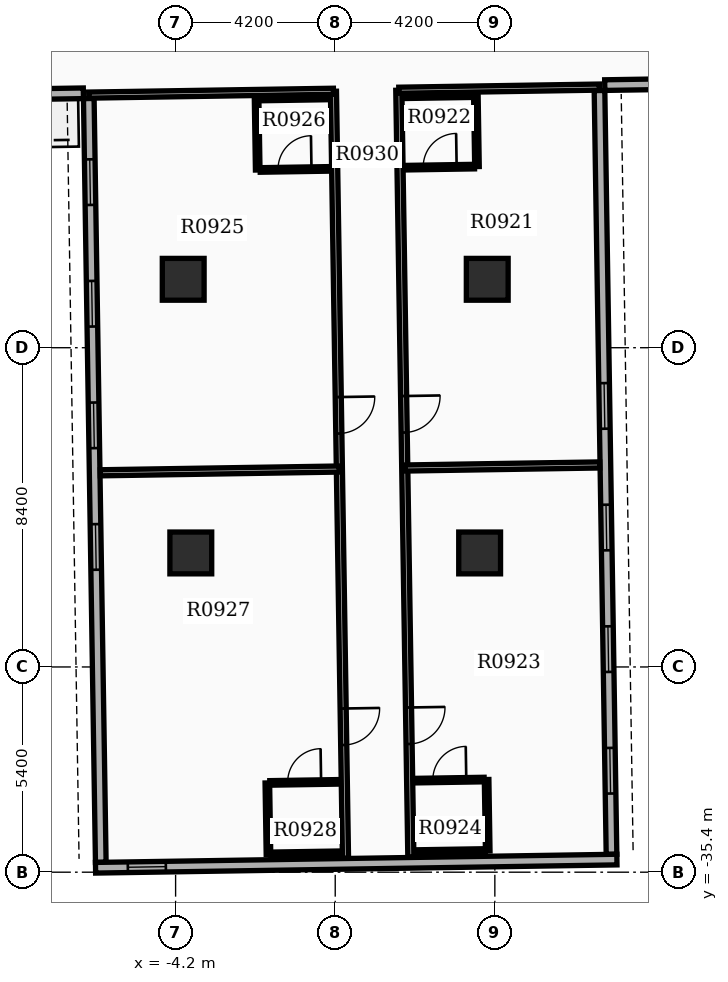
"""IFC4 building model, lengths in metres.
Left out: names, types, materials, properties, quantities, classifications, styles, units other than length and angle.
Written with IfcOpenShell. Run it as: python <this file> out.ifc"""

import sys

from ifc_helpers import new_model, si_unit, direction, frame, frame_2d, origin, origin_2d, place, context, subcontext, project, spatial, rectangle, extrude, element, fill, save


model = new_model("IFC4")
c1 = context("Model", 3, precision=1e-05, world=origin(), true_north=direction((0.0, 1.0)))
c2 = subcontext(c1, "Body", "Model", "MODEL_VIEW")
j1 = project(units=[si_unit("LENGTHUNIT", "METRE"), si_unit("PLANEANGLEUNIT", "RADIAN")], contexts=[c1])
p1 = place(None, origin())
s1 = spatial("IfcSite", under=j1, at=p1, CompositionType="ELEMENT")
p2 = place(p1, origin())
s2 = spatial("IfcBuilding", under=s1, at=p2, CompositionType="ELEMENT")
p3 = place(p2, frame((0.0, 0.0, 60.0)))
s3 = spatial("IfcBuildingStorey", under=s2, at=p3, CompositionType="ELEMENT", Elevation=60.0)
for number, where, z_axis, x_axis in (
    (1, (-4.0, -19.8, 0.0), (0.0, 0.0, 1.0), (1.0, 0.0, 0.0)),
    (2, (4.0, -19.8, 0.0), (0.0, 0.0, 1.0), (1.0, 0.0, 0.0)),
    (3, (-3.8, -27.0, 0.0), (0.0, 0.0, 1.0), (1.0, 0.0, 0.0)),
    (4, (3.8, -27.0, 0.0), (0.0, 0.0, 1.0), (1.0, 0.0, 0.0)),
):
    element("IfcColumn", number, at=place(p3, frame(where, z_axis=z_axis, x_axis=x_axis)), inside=s3, PredefinedType="COLUMN", context=c2, shape_type="SweptSolid", body=[
        extrude(rectangle(XDim=1.1, YDim=1.1, at=origin_2d()), origin(), (0.0, 0.0, 1.0), 3.9),
    ])
p4 = place(p3, frame((-6.485, -15.044, 0.0), z_axis=(0.0, 0.0, 1.0), x_axis=(0.01571739401, -0.999876474133, 0.0)))
e5 = element("IfcWall", 5, at=p4, inside=s3, PredefinedType="STANDARD", context=c2, shape_type="SweptSolid", body=[
    extrude(rectangle(XDim=20.1, YDim=0.28, at=frame_2d((10.05, 0.0))), origin(), (0.0, 0.0, 1.0), 2.91),
])
p5 = place(p4, frame((1.6, 0.0, 0.8)))
e6 = element("IfcOpeningElement", 6, at=p5, cuts=e5, PredefinedType="OPENING", context=c2, shape_type="SweptSolid", body=[
    extrude(rectangle(XDim=1.2, YDim=1.6, at=frame_2d((0.6, 0.8))), frame((0.0, 0.15, 0.0), z_axis=(0.0, -1.0, 0.0), x_axis=(1.0, 0.0, 0.0)), (0.0, 0.0, 1.0), 0.3),
])
p6 = place(p4, frame((4.8, 0.0, 0.8)))
e7 = element("IfcOpeningElement", 7, at=p6, cuts=e5, PredefinedType="OPENING", context=c2, shape_type="SweptSolid", body=[
    extrude(rectangle(XDim=1.2, YDim=1.6, at=frame_2d((0.6, 0.8))), frame((0.0, 0.15, 0.0), z_axis=(0.0, -1.0, 0.0), x_axis=(1.0, 0.0, 0.0)), (0.0, 0.0, 1.0), 0.3),
])
p7 = place(p4, frame((8.0, 0.0, 0.8)))
e8 = element("IfcOpeningElement", 8, at=p7, cuts=e5, PredefinedType="OPENING", context=c2, shape_type="SweptSolid", body=[
    extrude(rectangle(XDim=1.2, YDim=1.6, at=frame_2d((0.6, 0.8))), frame((0.0, 0.15, 0.0), z_axis=(0.0, -1.0, 0.0), x_axis=(1.0, 0.0, 0.0)), (0.0, 0.0, 1.0), 0.3),
])
p8 = place(p4, frame((11.2, 0.0, 0.8)))
e9 = element("IfcOpeningElement", 9, at=p8, cuts=e5, PredefinedType="OPENING", context=c2, shape_type="SweptSolid", body=[
    extrude(rectangle(XDim=1.2, YDim=1.6, at=frame_2d((0.6, 0.8))), frame((0.0, 0.15, 0.0), z_axis=(0.0, -1.0, 0.0), x_axis=(1.0, 0.0, 0.0)), (0.0, 0.0, 1.0), 0.3),
])
p9 = place(p3, frame((7.27, -34.93, 0.0), z_axis=(0.0, 0.0, 1.0), x_axis=(-0.015705059908, 0.999876667941, 0.0)))
e10 = element("IfcWall", 10, at=p9, inside=s3, PredefinedType="STANDARD", context=c2, shape_type="SweptSolid", body=[
    extrude(rectangle(XDim=20.1, YDim=0.28, at=frame_2d((10.05, 0.0))), origin(), (0.0, 0.0, 1.0), 2.91),
])
p10 = place(p9, frame((1.6, 0.0, 0.8)))
e11 = element("IfcOpeningElement", 11, at=p10, cuts=e10, PredefinedType="OPENING", context=c2, shape_type="SweptSolid", body=[
    extrude(rectangle(XDim=1.2, YDim=1.6, at=frame_2d((0.6, 0.8))), frame((0.0, 0.15, 0.0), z_axis=(0.0, -1.0, 0.0), x_axis=(1.0, 0.0, 0.0)), (0.0, 0.0, 1.0), 0.3),
])
p11 = place(p9, frame((4.8, 0.0, 0.8)))
e12 = element("IfcOpeningElement", 12, at=p11, cuts=e10, PredefinedType="OPENING", context=c2, shape_type="SweptSolid", body=[
    extrude(rectangle(XDim=1.2, YDim=1.6, at=frame_2d((0.6, 0.8))), frame((0.0, 0.15, 0.0), z_axis=(0.0, -1.0, 0.0), x_axis=(1.0, 0.0, 0.0)), (0.0, 0.0, 1.0), 0.3),
])
p12 = place(p9, frame((8.0, 0.0, 0.8)))
e13 = element("IfcOpeningElement", 13, at=p12, cuts=e10, PredefinedType="OPENING", context=c2, shape_type="SweptSolid", body=[
    extrude(rectangle(XDim=1.2, YDim=1.6, at=frame_2d((0.6, 0.8))), frame((0.0, 0.15, 0.0), z_axis=(0.0, -1.0, 0.0), x_axis=(1.0, 0.0, 0.0)), (0.0, 0.0, 1.0), 0.3),
])
p13 = place(p9, frame((11.2, 0.0, 0.8)))
e14 = element("IfcOpeningElement", 14, at=p13, cuts=e10, PredefinedType="OPENING", context=c2, shape_type="SweptSolid", body=[
    extrude(rectangle(XDim=1.2, YDim=1.6, at=frame_2d((0.6, 0.8))), frame((0.0, 0.15, 0.0), z_axis=(0.0, -1.0, 0.0), x_axis=(1.0, 0.0, 0.0)), (0.0, 0.0, 1.0), 0.3),
])
p14 = place(p3, frame((-6.307, -35.283, 0.0), z_axis=(0.0, 0.0, 1.0), x_axis=(0.999876549481, 0.015712599986, 0.0)))
e15 = element("IfcWall", 15, at=p14, inside=s3, PredefinedType="STANDARD", context=c2, shape_type="SweptSolid", body=[
    extrude(rectangle(XDim=13.72, YDim=0.28, at=frame_2d((6.86, 0.0))), origin(), (0.0, 0.0, 1.0), 2.91),
])
p15 = place(p14, frame((0.85, 0.0, 0.85)))
e16 = element("IfcOpeningElement", 16, at=p15, cuts=e15, PredefinedType="OPENING", context=c2, shape_type="SweptSolid", body=[
    extrude(rectangle(XDim=1.0, YDim=1.5, at=frame_2d((0.5, 0.75))), frame((0.0, 0.15, 0.0), z_axis=(0.0, -1.0, 0.0), x_axis=(1.0, 0.0, 0.0)), (0.0, 0.0, 1.0), 0.3),
])
p16 = place(p3, frame((-12.926, -15.005, 0.0), z_axis=(0.0, 0.0, 1.0), x_axis=(0.999876823822, 0.015695132501, 0.0)))
e17 = element("IfcWall", 17, at=p16, inside=s3, PredefinedType="STANDARD", context=c2, shape_type="SweptSolid", body=[
    extrude(rectangle(XDim=6.3, YDim=0.28, at=frame_2d((3.15, 0.0))), origin(), (0.0, 0.0, 1.0), 2.91),
])
p17 = place(p3, frame((13.391, -14.592, 0.0), z_axis=(0.0, 0.0, 1.0), x_axis=(-0.999876833368, -0.015694524359, 0.0)))
e18 = element("IfcWall", 18, at=p17, inside=s3, PredefinedType="STANDARD", context=c2, shape_type="SweptSolid", body=[
    extrude(rectangle(XDim=6.3, YDim=0.28, at=frame_2d((3.15, 0.0))), origin(), (0.0, 0.0, 1.0), 2.91),
])
p18 = place(p3, frame((1.673, -14.825, 0.0), z_axis=(0.0, 0.0, 1.0), x_axis=(0.015701893165, -0.999876717676, 0.0)))
e19 = element("IfcWall", 19, at=p18, inside=s3, PredefinedType="PARTITIONING", context=c2, shape_type="SweptSolid", body=[
    extrude(rectangle(XDim=20.182, YDim=0.16, at=frame_2d((10.091, 0.0))), origin(), (0.0, 0.0, 1.0), 2.9),
])
p19 = place(p18, frame((8.047, 0.0, 0.0)))
e20 = element("IfcOpeningElement", 20, at=p19, cuts=e19, PredefinedType="OPENING", context=c2, shape_type="SweptSolid", body=[
    extrude(rectangle(XDim=0.96, YDim=2.15, at=frame_2d((0.48, 1.075))), frame((0.0, 0.09, 0.0), z_axis=(0.0, -1.0, 0.0), x_axis=(1.0, 0.0, 0.0)), (0.0, 0.0, 1.0), 0.18),
])
p20 = place(p18, frame((16.243, 0.0, 0.0)))
e21 = element("IfcOpeningElement", 21, at=p20, cuts=e19, PredefinedType="OPENING", context=c2, shape_type="SweptSolid", body=[
    extrude(rectangle(XDim=0.96, YDim=2.15, at=frame_2d((0.48, 1.075))), frame((0.0, 0.09, 0.0), z_axis=(0.0, -1.0, 0.0), x_axis=(1.0, 0.0, 0.0)), (0.0, 0.0, 1.0), 0.18),
])
p21 = place(p3, frame((1.673, -14.825, 0.0), z_axis=(0.0, 0.0, 1.0), x_axis=(0.999877138082, 0.015675099418, 0.0)))
e22 = element("IfcWall", 22, at=p21, inside=s3, PredefinedType="PARTITIONING", context=c2, shape_type="SweptSolid", body=[
    extrude(rectangle(XDim=5.28, YDim=0.16, at=frame_2d((2.64, 0.0))), origin(), (0.0, 0.0, 1.0), 2.9),
])
p22 = place(p3, frame((1.829, -24.765, 0.0), z_axis=(0.0, 0.0, 1.0), x_axis=(0.99987677651, 0.01569814626, 0.0)))
e23 = element("IfcWall", 23, at=p22, inside=s3, PredefinedType="PARTITIONING", context=c2, shape_type="SweptSolid", body=[
    extrude(rectangle(XDim=5.132, YDim=0.16, at=frame_2d((2.566, 0.0))), origin(), (0.0, 0.0, 1.0), 2.9),
])
p23 = place(p3, frame((1.845, -16.863, 0.0), z_axis=(0.0, 0.0, 1.0), x_axis=(0.999876803258, 0.015696442504, 0.0)))
e24 = element("IfcWall", 24, at=p23, inside=s3, PredefinedType="PARTITIONING", context=c2, shape_type="SweptSolid", body=[
    extrude(rectangle(XDim=1.82, YDim=0.12, at=frame_2d((0.91, 0.0))), origin(), (0.0, 0.0, 1.0), 2.9),
])
p24 = place(p23, frame((0.47, 0.0, 0.0)))
e25 = element("IfcOpeningElement", 25, at=p24, cuts=e24, PredefinedType="OPENING", context=c2, shape_type="SweptSolid", body=[
    extrude(rectangle(XDim=0.88, YDim=2.1, at=frame_2d((0.44, 1.05))), frame((0.0, 0.07, 0.0), z_axis=(0.0, -1.0, 0.0), x_axis=(1.0, 0.0, 0.0)), (0.0, 0.0, 1.0), 0.14),
])
p25 = place(p3, frame((1.816, -14.983, 0.0), z_axis=(0.0, 0.0, 1.0), x_axis=(0.999874688728, 0.015830566654, 0.0)))
e26 = element("IfcWall", 26, at=p25, inside=s3, PredefinedType="PARTITIONING", context=c2, shape_type="SweptSolid", body=[
    extrude(rectangle(XDim=1.82, YDim=0.12, at=frame_2d((0.91, 0.0))), origin(), (0.0, 0.0, 1.0), 2.9),
])
p26 = place(p3, frame((3.7, -14.954, 0.0), z_axis=(0.0, 0.0, 1.0), x_axis=(0.015842167482, -0.99987450499, 0.0)))
e27 = element("IfcWall", 27, at=p26, inside=s3, PredefinedType="PARTITIONING", context=c2, shape_type="SweptSolid", body=[
    extrude(rectangle(XDim=1.88, YDim=0.12, at=frame_2d((0.94, 0.0))), origin(), (0.0, 0.0, 1.0), 2.9),
])
p27 = place(p3, frame((2.098, -32.991, 0.0), z_axis=(0.0, 0.0, 1.0), x_axis=(0.999874722342, 0.015828443418, 0.0)))
e28 = element("IfcWall", 28, at=p27, inside=s3, PredefinedType="PARTITIONING", context=c2, shape_type="SweptSolid", body=[
    extrude(rectangle(XDim=1.82, YDim=0.12, at=frame_2d((0.91, 0.0))), origin(), (0.0, 0.0, 1.0), 2.9),
])
p28 = place(p27, frame((0.47, 0.0, 0.0)))
e29 = element("IfcOpeningElement", 29, at=p28, cuts=e28, PredefinedType="OPENING", context=c2, shape_type="SweptSolid", body=[
    extrude(rectangle(XDim=0.88, YDim=2.1, at=frame_2d((0.44, 1.05))), frame((0.0, 0.07, 0.0), z_axis=(0.0, -1.0, 0.0), x_axis=(1.0, 0.0, 0.0)), (0.0, 0.0, 1.0), 0.14),
])
p29 = place(p3, frame((2.128, -34.871, 0.0), z_axis=(0.0, 0.0, 1.0), x_axis=(0.999876836305, 0.015694337248, 0.0)))
e30 = element("IfcWall", 30, at=p29, inside=s3, PredefinedType="PARTITIONING", context=c2, shape_type="SweptSolid", body=[
    extrude(rectangle(XDim=1.82, YDim=0.12, at=frame_2d((0.91, 0.0))), origin(), (0.0, 0.0, 1.0), 2.9),
])
p30 = place(p3, frame((3.983, -32.961, 0.0), z_axis=(0.0, 0.0, 1.0), x_axis=(0.01571234584, -0.999876553475, 0.0)))
e31 = element("IfcWall", 31, at=p30, inside=s3, PredefinedType="PARTITIONING", context=c2, shape_type="SweptSolid", body=[
    extrude(rectangle(XDim=1.88, YDim=0.12, at=frame_2d((0.94, 0.0))), origin(), (0.0, 0.0, 1.0), 2.9),
])
p31 = place(p3, frame((-0.047, -14.853, 0.0), z_axis=(0.0, 0.0, 1.0), x_axis=(0.015701893165, -0.999876717676, 0.0)))
e32 = element("IfcWall", 32, at=p31, inside=s3, PredefinedType="PARTITIONING", context=c2, shape_type="SweptSolid", body=[
    extrude(rectangle(XDim=20.182, YDim=0.16, at=frame_2d((10.091, 0.0))), origin(), (0.0, 0.0, 1.0), 2.9),
])
p32 = place(p31, frame((8.047, 0.0, 0.0)))
e33 = element("IfcOpeningElement", 33, at=p32, cuts=e32, PredefinedType="OPENING", context=c2, shape_type="SweptSolid", body=[
    extrude(rectangle(XDim=0.96, YDim=2.15, at=frame_2d((0.48, 1.075))), frame((0.0, 0.09, 0.0), z_axis=(0.0, -1.0, 0.0), x_axis=(1.0, 0.0, 0.0)), (0.0, 0.0, 1.0), 0.18),
])
p33 = place(p31, frame((16.243, 0.0, 0.0)))
e34 = element("IfcOpeningElement", 34, at=p33, cuts=e32, PredefinedType="OPENING", context=c2, shape_type="SweptSolid", body=[
    extrude(rectangle(XDim=0.96, YDim=2.15, at=frame_2d((0.48, 1.075))), frame((0.0, 0.09, 0.0), z_axis=(0.0, -1.0, 0.0), x_axis=(1.0, 0.0, 0.0)), (0.0, 0.0, 1.0), 0.18),
])
p34 = place(p3, frame((-0.047, -14.853, 0.0), z_axis=(0.0, 0.0, 1.0), x_axis=(-0.99987682984, -0.015694749102, 0.0)))
e35 = element("IfcWall", 35, at=p34, inside=s3, PredefinedType="PARTITIONING", context=c2, shape_type="SweptSolid", body=[
    extrude(rectangle(XDim=6.44, YDim=0.16, at=frame_2d((3.22, 0.0))), origin(), (0.0, 0.0, 1.0), 2.9),
])
p35 = place(p3, frame((0.109, -24.792, 0.0), z_axis=(0.0, 0.0, 1.0), x_axis=(-0.999876517768, -0.01571461794, 0.0)))
e36 = element("IfcWall", 36, at=p35, inside=s3, PredefinedType="PARTITIONING", context=c2, shape_type="SweptSolid", body=[
    extrude(rectangle(XDim=6.292, YDim=0.16, at=frame_2d((3.146, 0.0))), origin(), (0.0, 0.0, 1.0), 2.9),
])
p36 = place(p3, frame((-1.974, -16.923, 0.0), z_axis=(0.0, 0.0, 1.0), x_axis=(0.999876803258, 0.015696442504, 0.0)))
e37 = element("IfcWall", 37, at=p36, inside=s3, PredefinedType="PARTITIONING", context=c2, shape_type="SweptSolid", body=[
    extrude(rectangle(XDim=1.82, YDim=0.12, at=frame_2d((0.91, 0.0))), origin(), (0.0, 0.0, 1.0), 2.9),
])
p37 = place(p36, frame((0.47, 0.0, 0.0)))
e38 = element("IfcOpeningElement", 38, at=p37, cuts=e37, PredefinedType="OPENING", context=c2, shape_type="SweptSolid", body=[
    extrude(rectangle(XDim=0.88, YDim=2.1, at=frame_2d((0.44, 1.05))), frame((0.0, 0.07, 0.0), z_axis=(0.0, -1.0, 0.0), x_axis=(1.0, 0.0, 0.0)), (0.0, 0.0, 1.0), 0.14),
])
p38 = place(p3, frame((-2.004, -15.043, 0.0), z_axis=(0.0, 0.0, 1.0), x_axis=(0.999876836305, 0.015694337248, 0.0)))
e39 = element("IfcWall", 39, at=p38, inside=s3, PredefinedType="PARTITIONING", context=c2, shape_type="SweptSolid", body=[
    extrude(rectangle(XDim=1.82, YDim=0.12, at=frame_2d((0.91, 0.0))), origin(), (0.0, 0.0, 1.0), 2.9),
])
p39 = place(p3, frame((-2.069, -15.044, 0.0), z_axis=(0.0, 0.0, 1.0), x_axis=(0.015714386166, -0.99987652141, 0.0)))
e40 = element("IfcWall", 40, at=p39, inside=s3, PredefinedType="PARTITIONING", context=c2, shape_type="SweptSolid", body=[
    extrude(rectangle(XDim=1.88, YDim=0.12, at=frame_2d((0.94, 0.0))), origin(), (0.0, 0.0, 1.0), 2.9),
])
p40 = place(p3, frame((-1.721, -33.051, 0.0), z_axis=(0.0, 0.0, 1.0), x_axis=(0.999876836305, 0.015694337248, 0.0)))
e41 = element("IfcWall", 41, at=p40, inside=s3, PredefinedType="PARTITIONING", context=c2, shape_type="SweptSolid", body=[
    extrude(rectangle(XDim=1.82, YDim=0.12, at=frame_2d((0.91, 0.0))), origin(), (0.0, 0.0, 1.0), 2.9),
])
p41 = place(p40, frame((0.47, 0.0, 0.0)))
e42 = element("IfcOpeningElement", 42, at=p41, cuts=e41, PredefinedType="OPENING", context=c2, shape_type="SweptSolid", body=[
    extrude(rectangle(XDim=0.88, YDim=2.1, at=frame_2d((0.44, 1.05))), frame((0.0, 0.07, 0.0), z_axis=(0.0, -1.0, 0.0), x_axis=(1.0, 0.0, 0.0)), (0.0, 0.0, 1.0), 0.14),
])
p42 = place(p3, frame((-1.691, -34.931, 0.0), z_axis=(0.0, 0.0, 1.0), x_axis=(0.999876803258, 0.015696442504, 0.0)))
e43 = element("IfcWall", 43, at=p42, inside=s3, PredefinedType="PARTITIONING", context=c2, shape_type="SweptSolid", body=[
    extrude(rectangle(XDim=1.82, YDim=0.12, at=frame_2d((0.91, 0.0))), origin(), (0.0, 0.0, 1.0), 2.9),
])
p43 = place(p3, frame((-1.786, -33.052, 0.0), z_axis=(0.0, 0.0, 1.0), x_axis=(0.01571234584, -0.999876553475, 0.0)))
e44 = element("IfcWall", 44, at=p43, inside=s3, PredefinedType="PARTITIONING", context=c2, shape_type="SweptSolid", body=[
    extrude(rectangle(XDim=1.88, YDim=0.12, at=frame_2d((0.94, 0.0))), origin(), (0.0, 0.0, 1.0), 2.9),
])
p44 = place(p5, origin())
e45 = element("IfcWindow", 45, at=p44, inside=s3, PartitioningType="SINGLE_PANEL", PredefinedType="WINDOW", context=c2, shape_type="SweptSolid", body=[
    extrude(rectangle(XDim=1.2, YDim=1.6, at=frame_2d((0.6, 0.8))), frame((0.0, 0.03, 0.0), z_axis=(0.0, -1.0, 0.0), x_axis=(1.0, 0.0, 0.0)), (0.0, 0.0, 1.0), 0.06),
])
fill(e6, e45)
p45 = place(p6, origin())
e46 = element("IfcWindow", 46, at=p45, inside=s3, PartitioningType="SINGLE_PANEL", PredefinedType="WINDOW", context=c2, shape_type="SweptSolid", body=[
    extrude(rectangle(XDim=1.2, YDim=1.6, at=frame_2d((0.6, 0.8))), frame((0.0, 0.03, 0.0), z_axis=(0.0, -1.0, 0.0), x_axis=(1.0, 0.0, 0.0)), (0.0, 0.0, 1.0), 0.06),
])
fill(e7, e46)
p46 = place(p7, origin())
e47 = element("IfcWindow", 47, at=p46, inside=s3, PartitioningType="SINGLE_PANEL", PredefinedType="WINDOW", context=c2, shape_type="SweptSolid", body=[
    extrude(rectangle(XDim=1.2, YDim=1.6, at=frame_2d((0.6, 0.8))), frame((0.0, 0.03, 0.0), z_axis=(0.0, -1.0, 0.0), x_axis=(1.0, 0.0, 0.0)), (0.0, 0.0, 1.0), 0.06),
])
fill(e8, e47)
p47 = place(p8, origin())
e48 = element("IfcWindow", 48, at=p47, inside=s3, PartitioningType="SINGLE_PANEL", PredefinedType="WINDOW", context=c2, shape_type="SweptSolid", body=[
    extrude(rectangle(XDim=1.2, YDim=1.6, at=frame_2d((0.6, 0.8))), frame((0.0, 0.03, 0.0), z_axis=(0.0, -1.0, 0.0), x_axis=(1.0, 0.0, 0.0)), (0.0, 0.0, 1.0), 0.06),
])
fill(e9, e48)
p48 = place(p10, origin())
e49 = element("IfcWindow", 49, at=p48, inside=s3, PartitioningType="SINGLE_PANEL", PredefinedType="WINDOW", context=c2, shape_type="SweptSolid", body=[
    extrude(rectangle(XDim=1.2, YDim=1.6, at=frame_2d((0.6, 0.8))), frame((0.0, 0.03, 0.0), z_axis=(0.0, -1.0, 0.0), x_axis=(1.0, 0.0, 0.0)), (0.0, 0.0, 1.0), 0.06),
])
fill(e11, e49)
p49 = place(p11, origin())
e50 = element("IfcWindow", 50, at=p49, inside=s3, PartitioningType="SINGLE_PANEL", PredefinedType="WINDOW", context=c2, shape_type="SweptSolid", body=[
    extrude(rectangle(XDim=1.2, YDim=1.6, at=frame_2d((0.6, 0.8))), frame((0.0, 0.03, 0.0), z_axis=(0.0, -1.0, 0.0), x_axis=(1.0, 0.0, 0.0)), (0.0, 0.0, 1.0), 0.06),
])
fill(e12, e50)
p50 = place(p12, origin())
e51 = element("IfcWindow", 51, at=p50, inside=s3, PartitioningType="SINGLE_PANEL", PredefinedType="WINDOW", context=c2, shape_type="SweptSolid", body=[
    extrude(rectangle(XDim=1.2, YDim=1.6, at=frame_2d((0.6, 0.8))), frame((0.0, 0.03, 0.0), z_axis=(0.0, -1.0, 0.0), x_axis=(1.0, 0.0, 0.0)), (0.0, 0.0, 1.0), 0.06),
])
fill(e13, e51)
p51 = place(p13, origin())
e52 = element("IfcWindow", 52, at=p51, inside=s3, PartitioningType="SINGLE_PANEL", PredefinedType="WINDOW", context=c2, shape_type="SweptSolid", body=[
    extrude(rectangle(XDim=1.2, YDim=1.6, at=frame_2d((0.6, 0.8))), frame((0.0, 0.03, 0.0), z_axis=(0.0, -1.0, 0.0), x_axis=(1.0, 0.0, 0.0)), (0.0, 0.0, 1.0), 0.06),
])
fill(e14, e52)
p52 = place(p15, origin())
e53 = element("IfcWindow", 53, at=p52, inside=s3, PartitioningType="SINGLE_PANEL", PredefinedType="WINDOW", context=c2, shape_type="SweptSolid", body=[
    extrude(rectangle(XDim=1.0, YDim=1.5, at=frame_2d((0.5, 0.75))), frame((0.0, 0.03, 0.0), z_axis=(0.0, -1.0, 0.0), x_axis=(1.0, 0.0, 0.0)), (0.0, 0.0, 1.0), 0.06),
])
fill(e16, e53)
p53 = place(p19, origin())
e54 = element("IfcDoor", 54, at=p53, inside=s3, OperationType="SINGLE_SWING_LEFT", PredefinedType="DOOR", context=c2, shape_type="SweptSolid", body=[
    extrude(rectangle(XDim=0.96, YDim=2.15, at=frame_2d((0.48, 1.075))), frame((0.0, 0.025, 0.0), z_axis=(0.0, -1.0, 0.0), x_axis=(1.0, 0.0, 0.0)), (0.0, 0.0, 1.0), 0.05),
])
fill(e20, e54)
p54 = place(p24, origin())
e55 = element("IfcDoor", 55, at=p54, inside=s3, OperationType="SINGLE_SWING_RIGHT", PredefinedType="DOOR", context=c2, shape_type="SweptSolid", body=[
    extrude(rectangle(XDim=0.88, YDim=2.1, at=frame_2d((0.44, 1.05))), frame((0.0, 0.025, 0.0), z_axis=(0.0, -1.0, 0.0), x_axis=(1.0, 0.0, 0.0)), (0.0, 0.0, 1.0), 0.05),
])
fill(e25, e55)
p55 = place(p20, origin())
e56 = element("IfcDoor", 56, at=p55, inside=s3, OperationType="SINGLE_SWING_LEFT", PredefinedType="DOOR", context=c2, shape_type="SweptSolid", body=[
    extrude(rectangle(XDim=0.96, YDim=2.15, at=frame_2d((0.48, 1.075))), frame((0.0, 0.025, 0.0), z_axis=(0.0, -1.0, 0.0), x_axis=(1.0, 0.0, 0.0)), (0.0, 0.0, 1.0), 0.05),
])
fill(e21, e56)
p56 = place(p28, origin())
e57 = element("IfcDoor", 57, at=p56, inside=s3, OperationType="SINGLE_SWING_RIGHT", PredefinedType="DOOR", context=c2, shape_type="SweptSolid", body=[
    extrude(rectangle(XDim=0.88, YDim=2.1, at=frame_2d((0.44, 1.05))), frame((0.0, 0.025, 0.0), z_axis=(0.0, -1.0, 0.0), x_axis=(1.0, 0.0, 0.0)), (0.0, 0.0, 1.0), 0.05),
])
fill(e29, e57)
p57 = place(p32, origin())
e58 = element("IfcDoor", 58, at=p57, inside=s3, OperationType="SINGLE_SWING_LEFT", PredefinedType="DOOR", context=c2, shape_type="SweptSolid", body=[
    extrude(rectangle(XDim=0.96, YDim=2.15, at=frame_2d((0.48, 1.075))), frame((0.0, 0.025, 0.0), z_axis=(0.0, -1.0, 0.0), x_axis=(1.0, 0.0, 0.0)), (0.0, 0.0, 1.0), 0.05),
])
fill(e33, e58)
p58 = place(p37, origin())
e59 = element("IfcDoor", 59, at=p58, inside=s3, OperationType="SINGLE_SWING_RIGHT", PredefinedType="DOOR", context=c2, shape_type="SweptSolid", body=[
    extrude(rectangle(XDim=0.88, YDim=2.1, at=frame_2d((0.44, 1.05))), frame((0.0, 0.025, 0.0), z_axis=(0.0, -1.0, 0.0), x_axis=(1.0, 0.0, 0.0)), (0.0, 0.0, 1.0), 0.05),
])
fill(e38, e59)
p59 = place(p33, origin())
e60 = element("IfcDoor", 60, at=p59, inside=s3, OperationType="SINGLE_SWING_LEFT", PredefinedType="DOOR", context=c2, shape_type="SweptSolid", body=[
    extrude(rectangle(XDim=0.96, YDim=2.15, at=frame_2d((0.48, 1.075))), frame((0.0, 0.025, 0.0), z_axis=(0.0, -1.0, 0.0), x_axis=(1.0, 0.0, 0.0)), (0.0, 0.0, 1.0), 0.05),
])
fill(e34, e60)
p60 = place(p41, origin())
e61 = element("IfcDoor", 61, at=p60, inside=s3, OperationType="SINGLE_SWING_RIGHT", PredefinedType="DOOR", context=c2, shape_type="SweptSolid", body=[
    extrude(rectangle(XDim=0.88, YDim=2.1, at=frame_2d((0.44, 1.05))), frame((0.0, 0.025, 0.0), z_axis=(0.0, -1.0, 0.0), x_axis=(1.0, 0.0, 0.0)), (0.0, 0.0, 1.0), 0.05),
])
fill(e42, e61)
save(model, sys.argv[1])
